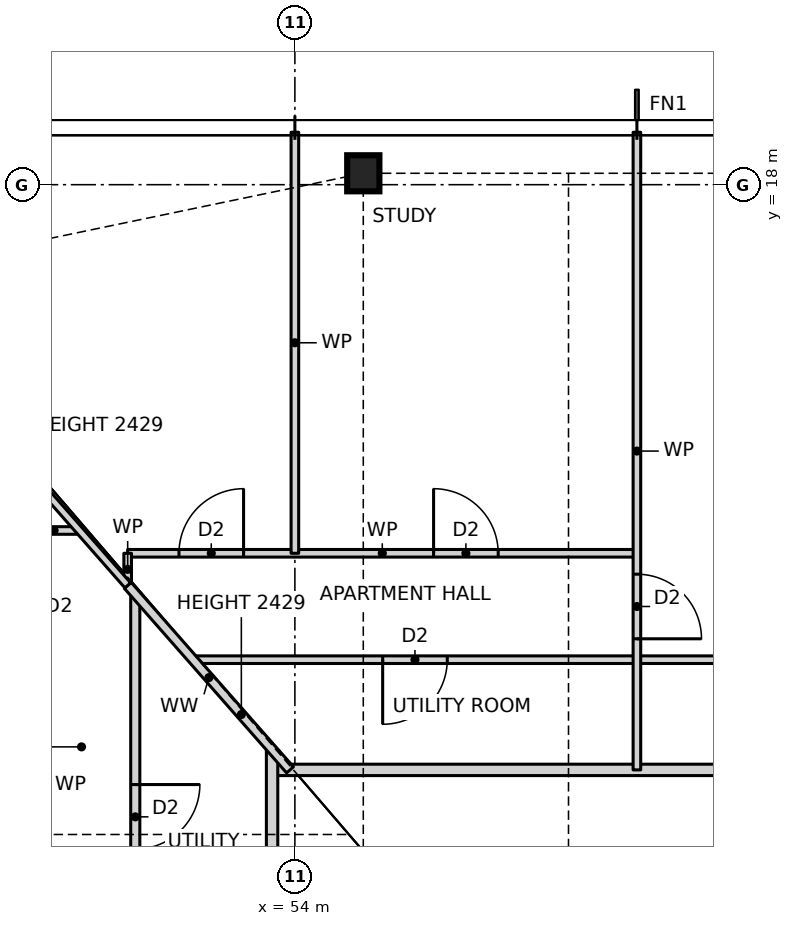
"""IFC4 building model, lengths in metres.
Left out: names, types, materials, properties, quantities, classifications, styles, units other than length and angle.
Written with IfcOpenShell. Run it as: python <this file> out.ifc"""

import sys

from ifc_helpers import new_model, si_unit, direction, frame, frame_2d, origin, origin_2d, place, context, subcontext, project, spatial, rectangle, i_section, extrude, element, fill, save


model = new_model("IFC4")
c1 = context("Model", 3, precision=1e-05, world=origin(), true_north=direction((0.0, 1.0)))
c2 = subcontext(c1, "Body", "Model", "MODEL_VIEW")
j1 = project(units=[si_unit("LENGTHUNIT", "METRE"), si_unit("PLANEANGLEUNIT", "RADIAN")], contexts=[c1])
p1 = place(None, origin())
s1 = spatial("IfcSite", under=j1, at=p1, CompositionType="ELEMENT")
p2 = place(p1, origin())
s2 = spatial("IfcBuilding", under=s1, at=p2, CompositionType="ELEMENT")
p3 = place(p2, frame((0.0, 0.0, 25.5)))
s3 = spatial("IfcBuildingStorey", under=s2, at=p3, CompositionType="ELEMENT", Elevation=25.5)
p4 = place(p3, frame((54.9, 18.15, 0.0), z_axis=(0.0, 0.0, 1.0), x_axis=(1.0, 0.0, 0.0)))
e1 = element("IfcColumn", 1, at=p4, inside=s3, PredefinedType="COLUMN", context=c2, shape_type="SweptSolid", body=[
    extrude(i_section(OverallWidth=0.424, OverallDepth=0.475, WebThickness=0.048, FlangeThickness=0.077, at=origin_2d()), origin(), (0.0, 0.0, 1.0), 3.5),
])
p5 = place(p3, frame((53.7, 10.3, 0.0), z_axis=(0.0, 0.0, 1.0), x_axis=(1.0, 0.0, 0.0)))
e2 = element("IfcWall", 2, at=p5, inside=s3, PredefinedType="PARTITIONING", context=c2, shape_type="SweptSolid", body=[
    extrude(rectangle(XDim=18.6, YDim=0.15, at=frame_2d((9.3, 0.0))), origin(), (0.0, 0.0, 1.0), 3.27),
])
p6 = place(p5, frame((8.3, 0.0, 0.0)))
e3 = element("IfcOpeningElement", 3, at=p6, cuts=e2, PredefinedType="OPENING", context=c2, shape_type="SweptSolid", body=[
    extrude(rectangle(XDim=1.0, YDim=2.1, at=frame_2d((0.5, 1.05))), frame((0.0, 0.085, 0.0), z_axis=(0.0, -1.0, 0.0), x_axis=(1.0, 0.0, 0.0)), (0.0, 0.0, 1.0), 0.17),
])
p7 = place(p3, frame((52.66, 11.75, 0.0), z_axis=(0.0, 0.0, 1.0), x_axis=(1.0, 0.0, 0.0)))
e4 = element("IfcWall", 4, at=p7, inside=s3, PredefinedType="PARTITIONING", context=c2, shape_type="SweptSolid", body=[
    extrude(rectangle(XDim=20.68, YDim=0.1, at=frame_2d((10.34, 0.0))), origin(), (0.0, 0.0, 1.0), 3.27),
])
p8 = place(p7, frame((12.615, 0.0, 0.0)))
e5 = element("IfcOpeningElement", 5, at=p8, cuts=e4, PredefinedType="OPENING", context=c2, shape_type="SweptSolid", body=[
    extrude(rectangle(XDim=0.85, YDim=2.1, at=frame_2d((0.425, 1.05))), frame((0.0, 0.06, 0.0), z_axis=(0.0, -1.0, 0.0), x_axis=(1.0, 0.0, 0.0)), (0.0, 0.0, 1.0), 0.12),
])
p9 = place(p7, frame((9.415, 0.0, 0.0)))
e6 = element("IfcOpeningElement", 6, at=p9, cuts=e4, PredefinedType="OPENING", context=c2, shape_type="SweptSolid", body=[
    extrude(rectangle(XDim=0.85, YDim=2.1, at=frame_2d((0.425, 1.05))), frame((0.0, 0.06, 0.0), z_axis=(0.0, -1.0, 0.0), x_axis=(1.0, 0.0, 0.0)), (0.0, 0.0, 1.0), 0.12),
])
p10 = place(p7, frame((17.335, 0.0, 0.0)))
e7 = element("IfcOpeningElement", 7, at=p10, cuts=e4, PredefinedType="OPENING", context=c2, shape_type="SweptSolid", body=[
    extrude(rectangle(XDim=0.85, YDim=2.1, at=frame_2d((0.425, 1.05))), frame((0.0, 0.06, 0.0), z_axis=(0.0, -1.0, 0.0), x_axis=(1.0, 0.0, 0.0)), (0.0, 0.0, 1.0), 0.12),
])
p11 = place(p7, frame((2.495, 0.0, 0.0)))
e8 = element("IfcOpeningElement", 8, at=p11, cuts=e4, PredefinedType="OPENING", context=c2, shape_type="SweptSolid", body=[
    extrude(rectangle(XDim=0.85, YDim=2.1, at=frame_2d((0.425, 1.05))), frame((0.0, 0.06, 0.0), z_axis=(0.0, -1.0, 0.0), x_axis=(1.0, 0.0, 0.0)), (0.0, 0.0, 1.0), 0.12),
])
p12 = place(p3, frame((51.8, 13.15, 0.0), z_axis=(0.0, 0.0, 1.0), x_axis=(1.0, 0.0, 0.0)))
e9 = element("IfcWall", 9, at=p12, inside=s3, PredefinedType="PARTITIONING", context=c2, shape_type="SweptSolid", body=[
    extrude(rectangle(XDim=6.7, YDim=0.1, at=frame_2d((3.35, 0.0))), origin(), (0.0, 0.0, 1.0), 3.27),
])
p13 = place(p12, frame((4.025, 0.0, 0.0)))
e10 = element("IfcOpeningElement", 10, at=p13, cuts=e9, PredefinedType="OPENING", context=c2, shape_type="SweptSolid", body=[
    extrude(rectangle(XDim=0.85, YDim=2.1, at=frame_2d((0.425, 1.05))), frame((0.0, 0.06, 0.0), z_axis=(0.0, -1.0, 0.0), x_axis=(1.0, 0.0, 0.0)), (0.0, 0.0, 1.0), 0.12),
])
p14 = place(p12, frame((0.675, 0.0, 0.0)))
e11 = element("IfcOpeningElement", 11, at=p14, cuts=e9, PredefinedType="OPENING", context=c2, shape_type="SweptSolid", body=[
    extrude(rectangle(XDim=0.85, YDim=2.1, at=frame_2d((0.425, 1.05))), frame((0.0, 0.06, 0.0), z_axis=(0.0, -1.0, 0.0), x_axis=(1.0, 0.0, 0.0)), (0.0, 0.0, 1.0), 0.12),
])
p15 = place(p3, frame((50.5, 13.45, 0.0), z_axis=(0.0, 0.0, 1.0), x_axis=(1.0, 0.0, 0.0)))
e12 = element("IfcWall", 12, at=p15, inside=s3, PredefinedType="PARTITIONING", context=c2, shape_type="SweptSolid", body=[
    extrude(rectangle(XDim=0.664, YDim=0.1, at=frame_2d((0.332, 0.0))), origin(), (0.0, 0.0, 1.0), 3.27),
])
p16 = place(p3, frame((58.5, 10.3, 0.0), z_axis=(0.0, 0.0, 1.0), x_axis=(0.0, 1.0, 0.0)))
e13 = element("IfcWall", 13, at=p16, inside=s3, PredefinedType="PARTITIONING", context=c2, shape_type="SweptSolid", body=[
    extrude(rectangle(XDim=8.39, YDim=0.1, at=frame_2d((4.195, 0.0))), origin(), (0.0, 0.0, 1.0), 3.27),
])
p17 = place(p16, frame((1.725, 0.0, 0.0)))
e14 = element("IfcOpeningElement", 14, at=p17, cuts=e13, PredefinedType="OPENING", context=c2, shape_type="SweptSolid", body=[
    extrude(rectangle(XDim=0.85, YDim=2.1, at=frame_2d((0.425, 1.05))), frame((0.0, 0.06, 0.0), z_axis=(0.0, -1.0, 0.0), x_axis=(1.0, 0.0, 0.0)), (0.0, 0.0, 1.0), 0.12),
])
p18 = place(p3, frame((54.0, 13.15, 0.0), z_axis=(0.0, 0.0, 1.0), x_axis=(0.0, 1.0, 0.0)))
e15 = element("IfcWall", 15, at=p18, inside=s3, PredefinedType="PARTITIONING", context=c2, shape_type="SweptSolid", body=[
    extrude(rectangle(XDim=5.54, YDim=0.1, at=frame_2d((2.77, 0.0))), origin(), (0.0, 0.0, 1.0), 3.27),
])
p19 = place(p3, frame((53.7, -10.568, 0.0), z_axis=(0.0, 0.0, 1.0), x_axis=(0.0, 1.0, 0.0)))
e16 = element("IfcWall", 16, at=p19, inside=s3, PredefinedType="PARTITIONING", context=c2, shape_type="SweptSolid", body=[
    extrude(rectangle(XDim=21.136, YDim=0.15, at=frame_2d((10.568, 0.0))), origin(), (0.0, 0.0, 1.0), 3.27),
])
p20 = place(p19, frame((11.818, 0.0, 0.0)))
e17 = element("IfcOpeningElement", 17, at=p20, cuts=e16, PredefinedType="OPENING", context=c2, shape_type="SweptSolid", body=[
    extrude(rectangle(XDim=1.0, YDim=2.1, at=frame_2d((0.5, 1.05))), frame((0.0, 0.085, 0.0), z_axis=(0.0, -1.0, 0.0), x_axis=(1.0, 0.0, 0.0)), (0.0, 0.0, 1.0), 0.17),
])
p21 = place(p3, frame((51.9, -12.614, 0.0), z_axis=(0.0, 0.0, 1.0), x_axis=(0.0, 1.0, 0.0)))
e18 = element("IfcWall", 18, at=p21, inside=s3, PredefinedType="PARTITIONING", context=c2, shape_type="SweptSolid", body=[
    extrude(rectangle(XDim=25.228, YDim=0.12, at=frame_2d((12.614, 0.0))), origin(), (0.0, 0.0, 1.0), 3.27),
])
p22 = place(p21, frame((17.139, 0.0, 0.0)))
e19 = element("IfcOpeningElement", 19, at=p22, cuts=e18, PredefinedType="OPENING", context=c2, shape_type="SweptSolid", body=[
    extrude(rectangle(XDim=0.85, YDim=2.1, at=frame_2d((0.425, 1.05))), frame((0.0, 0.07, 0.0), z_axis=(0.0, -1.0, 0.0), x_axis=(1.0, 0.0, 0.0)), (0.0, 0.0, 1.0), 0.14),
])
p23 = place(p21, frame((13.939, 0.0, 0.0)))
e20 = element("IfcOpeningElement", 20, at=p23, cuts=e18, PredefinedType="OPENING", context=c2, shape_type="SweptSolid", body=[
    extrude(rectangle(XDim=0.85, YDim=2.1, at=frame_2d((0.425, 1.05))), frame((0.0, 0.07, 0.0), z_axis=(0.0, -1.0, 0.0), x_axis=(1.0, 0.0, 0.0)), (0.0, 0.0, 1.0), 0.14),
])
p24 = place(p21, frame((21.871, 0.0, 0.0)))
e21 = element("IfcOpeningElement", 21, at=p24, cuts=e18, PredefinedType="OPENING", context=c2, shape_type="SweptSolid", body=[
    extrude(rectangle(XDim=0.85, YDim=2.1, at=frame_2d((0.425, 1.05))), frame((0.0, 0.07, 0.0), z_axis=(0.0, -1.0, 0.0), x_axis=(1.0, 0.0, 0.0)), (0.0, 0.0, 1.0), 0.14),
])
p25 = place(p21, frame((7.739, 0.0, 0.0)))
e22 = element("IfcOpeningElement", 22, at=p25, cuts=e18, PredefinedType="OPENING", context=c2, shape_type="SweptSolid", body=[
    extrude(rectangle(XDim=0.85, YDim=2.1, at=frame_2d((0.425, 1.05))), frame((0.0, 0.07, 0.0), z_axis=(0.0, -1.0, 0.0), x_axis=(1.0, 0.0, 0.0)), (0.0, 0.0, 1.0), 0.14),
])
p26 = place(p21, frame((2.557, 0.0, 0.0)))
e23 = element("IfcOpeningElement", 23, at=p26, cuts=e18, PredefinedType="OPENING", context=c2, shape_type="SweptSolid", body=[
    extrude(rectangle(XDim=0.85, YDim=2.1, at=frame_2d((0.425, 1.05))), frame((0.0, 0.07, 0.0), z_axis=(0.0, -1.0, 0.0), x_axis=(1.0, 0.0, 0.0)), (0.0, 0.0, 1.0), 0.14),
])
p27 = place(p3, frame((51.8, 12.727, 0.0), z_axis=(0.0, 0.0, 1.0), x_axis=(0.0, 1.0, 0.0)))
e24 = element("IfcWall", 24, at=p27, inside=s3, PredefinedType="PARTITIONING", context=c2, shape_type="SweptSolid", body=[
    extrude(rectangle(XDim=0.423, YDim=0.1, at=frame_2d((0.211, 0.0))), origin(), (0.0, 0.0, 1.0), 3.27),
])
p28 = place(p3, frame((53.936, 10.3, 0.0), z_axis=(0.0, 0.0, 1.0), x_axis=(-0.660384426006, 0.750927699508, 0.0)))
e25 = element("IfcWall", 25, at=p28, inside=s3, PredefinedType="PARTITIONING", context=c2, shape_type="SweptSolid", body=[
    extrude(rectangle(XDim=3.233, YDim=0.12, at=frame_2d((1.616, 0.0))), origin(), (0.0, 0.0, 1.0), 2.429),
])
p29 = place(p3, frame((51.801, 12.728, 0.0), z_axis=(0.0, 0.0, 1.0), x_axis=(-0.660356300202, 0.750952433103, 0.0)))
e26 = element("IfcWall", 26, at=p29, inside=s3, PredefinedType="PARTITIONING", context=c2, shape_type="SweptSolid", body=[
    extrude(rectangle(XDim=5.837, YDim=0.1, at=frame_2d((2.918, 0.0))), origin(), (0.0, 0.0, 1.0), 2.429),
])
p30 = place(p17, frame((0.85, 0.0, 0.0), z_axis=(0.0, 0.0, 1.0), x_axis=(-1.0, 0.0, 0.0)))
e27 = element("IfcDoor", 27, at=p30, inside=s3, OperationType="SINGLE_SWING_RIGHT", PredefinedType="DOOR", context=c2, shape_type="SweptSolid", body=[
    extrude(rectangle(XDim=0.85, YDim=2.1, at=frame_2d((0.425, 1.05))), frame((0.0, 0.025, 0.0), z_axis=(0.0, -1.0, 0.0), x_axis=(1.0, 0.0, 0.0)), (0.0, 0.0, 1.0), 0.05),
])
fill(e14, e27)
p31 = place(p13, origin())
e28 = element("IfcDoor", 28, at=p31, inside=s3, OperationType="SINGLE_SWING_LEFT", PredefinedType="DOOR", context=c2, shape_type="SweptSolid", body=[
    extrude(rectangle(XDim=0.85, YDim=2.1, at=frame_2d((0.425, 1.05))), frame((0.0, 0.025, 0.0), z_axis=(0.0, -1.0, 0.0), x_axis=(1.0, 0.0, 0.0)), (0.0, 0.0, 1.0), 0.05),
])
fill(e10, e28)
p32 = place(p14, origin())
e29 = element("IfcDoor", 29, at=p32, inside=s3, OperationType="SINGLE_SWING_RIGHT", PredefinedType="DOOR", context=c2, shape_type="SweptSolid", body=[
    extrude(rectangle(XDim=0.85, YDim=2.1, at=frame_2d((0.425, 1.05))), frame((0.0, 0.025, 0.0), z_axis=(0.0, -1.0, 0.0), x_axis=(1.0, 0.0, 0.0)), (0.0, 0.0, 1.0), 0.05),
])
fill(e11, e29)
p33 = place(p11, frame((0.85, 0.0, 0.0), z_axis=(0.0, 0.0, 1.0), x_axis=(-1.0, 0.0, 0.0)))
e30 = element("IfcDoor", 30, at=p33, inside=s3, OperationType="SINGLE_SWING_RIGHT", PredefinedType="DOOR", context=c2, shape_type="SweptSolid", body=[
    extrude(rectangle(XDim=0.85, YDim=2.1, at=frame_2d((0.425, 1.05))), frame((0.0, 0.025, 0.0), z_axis=(0.0, -1.0, 0.0), x_axis=(1.0, 0.0, 0.0)), (0.0, 0.0, 1.0), 0.05),
])
fill(e8, e30)
p34 = place(p24, frame((0.85, 0.0, 0.0), z_axis=(0.0, 0.0, 1.0), x_axis=(-1.0, 0.0, 0.0)))
e31 = element("IfcDoor", 31, at=p34, inside=s3, OperationType="SINGLE_SWING_LEFT", PredefinedType="DOOR", context=c2, shape_type="SweptSolid", body=[
    extrude(rectangle(XDim=0.85, YDim=2.1, at=frame_2d((0.425, 1.05))), frame((0.0, 0.025, 0.0), z_axis=(0.0, -1.0, 0.0), x_axis=(1.0, 0.0, 0.0)), (0.0, 0.0, 1.0), 0.05),
])
fill(e21, e31)
save(model, sys.argv[1])
